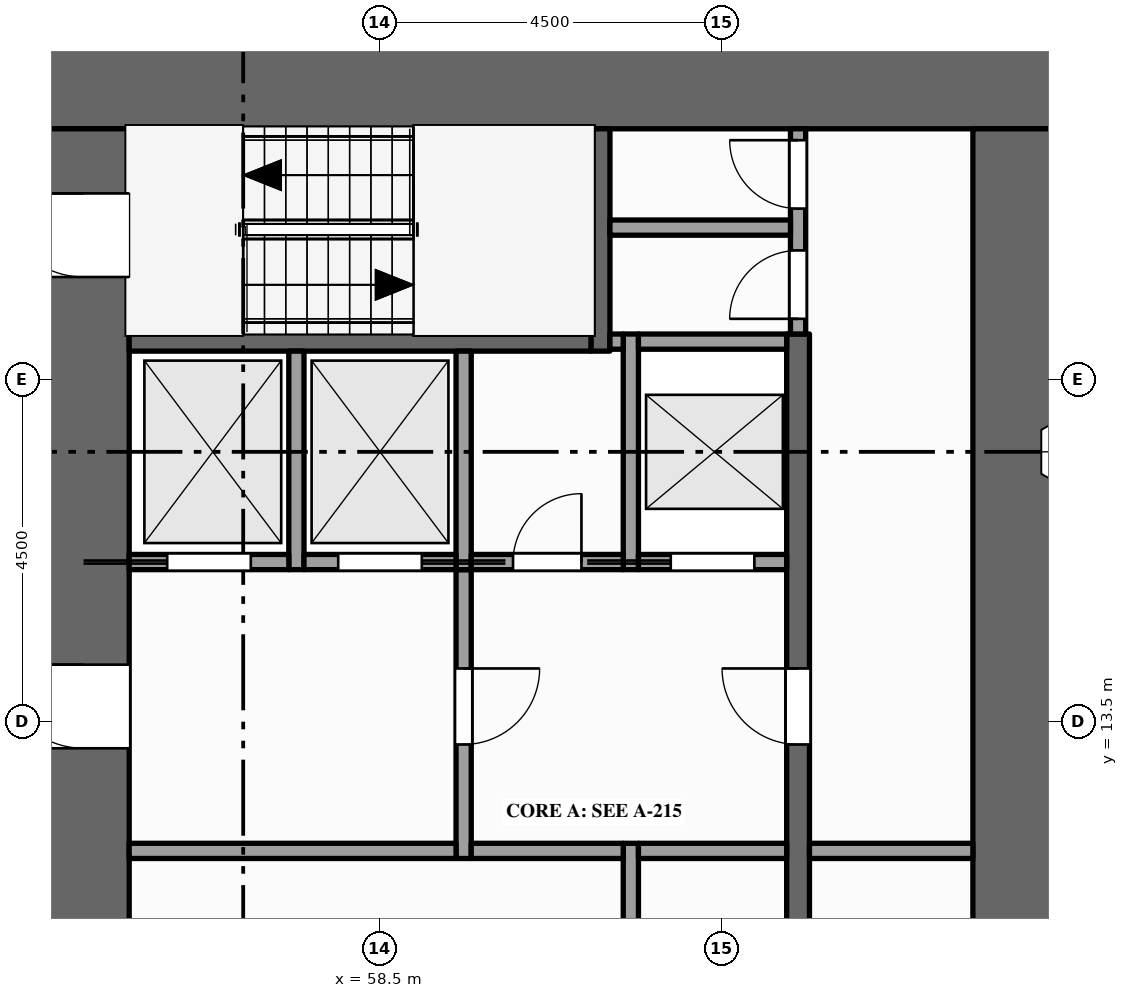
"""IFC4 building model, lengths in metres.
Left out: names, types, materials, properties, quantities, classifications, styles, units other than length and angle.
Written with IfcOpenShell. Run it as: python <this file> out.ifc"""

import sys

from ifc_helpers import new_model, si_unit, direction, frame, frame_2d, origin, place, context, subcontext, project, spatial, rectangle, extrude, element, fill, save


model = new_model("IFC4")
c1 = context("Model", 3, precision=1e-05, world=origin(), true_north=direction((0.0, 1.0)))
c2 = subcontext(c1, "Body", "Model", "MODEL_VIEW")
j1 = project(units=[si_unit("LENGTHUNIT", "METRE"), si_unit("PLANEANGLEUNIT", "RADIAN")], contexts=[c1])
p1 = place(None, origin())
s1 = spatial("IfcSite", under=j1, at=p1, CompositionType="ELEMENT")
p2 = place(p1, origin())
s2 = spatial("IfcBuilding", under=s1, at=p2, CompositionType="ELEMENT")
p3 = place(p2, frame((0.0, 0.0, 77.0)))
s3 = spatial("IfcBuildingStorey", under=s2, at=p3, CompositionType="ELEMENT", Elevation=77.0)
p4 = place(p3, frame((54.0, 21.9, -0.15), z_axis=(0.0, 0.0, 1.0), x_axis=(1.0, 0.0, 0.0)))
e1 = element("IfcWall", 1, at=p4, inside=s3, PredefinedType="SHEAR", context=c2, shape_type="SweptSolid", body=[
    extrude(rectangle(XDim=13.5, YDim=1.2, at=frame_2d((6.75, 0.0))), origin(), (0.0, 0.0, 1.0), 6.0),
])
p5 = place(p3, frame((54.6, 1.2, -0.15), z_axis=(0.0, 0.0, 1.0), x_axis=(0.0, 1.0, 0.0)))
e2 = element("IfcWall", 2, at=p5, inside=s3, PredefinedType="SHEAR", context=c2, shape_type="SweptSolid", body=[
    extrude(rectangle(XDim=20.1, YDim=1.2, at=frame_2d((10.05, 0.0))), origin(), (0.0, 0.0, 1.0), 6.0),
])
p6 = place(p5, frame((5.9, 0.0, 0.15)))
e3 = element("IfcOpeningElement", 3, at=p6, cuts=e2, PredefinedType="OPENING", context=c2, shape_type="SweptSolid", body=[
    extrude(rectangle(XDim=1.8, YDim=2.1, at=frame_2d((0.9, 1.05))), frame((0.0, 0.61, 0.0), z_axis=(0.0, -1.0, 0.0), x_axis=(1.0, 0.0, 0.0)), (0.0, 0.0, 1.0), 1.22),
])
p7 = place(p5, frame((11.95, 0.0, 0.15)))
e4 = element("IfcOpeningElement", 4, at=p7, cuts=e2, PredefinedType="OPENING", context=c2, shape_type="SweptSolid", body=[
    extrude(rectangle(XDim=1.1, YDim=2.1, at=frame_2d((0.55, 1.05))), frame((0.0, 0.61, 0.0), z_axis=(0.0, -1.0, 0.0), x_axis=(1.0, 0.0, 0.0)), (0.0, 0.0, 1.0), 1.22),
])
p8 = place(p5, frame((0.95, 0.0, 0.15)))
e5 = element("IfcOpeningElement", 5, at=p8, cuts=e2, PredefinedType="OPENING", context=c2, shape_type="SweptSolid", body=[
    extrude(rectangle(XDim=1.1, YDim=2.1, at=frame_2d((0.55, 1.05))), frame((0.0, 0.61, 0.0), z_axis=(0.0, -1.0, 0.0), x_axis=(1.0, 0.0, 0.0)), (0.0, 0.0, 1.0), 1.22),
])
p9 = place(p5, frame((18.15, 0.0, 0.15)))
e6 = element("IfcOpeningElement", 6, at=p9, cuts=e2, PredefinedType="OPENING", context=c2, shape_type="SweptSolid", body=[
    extrude(rectangle(XDim=1.1, YDim=2.1, at=frame_2d((0.55, 1.05))), frame((0.0, 0.61, 0.0), z_axis=(0.0, -1.0, 0.0), x_axis=(1.0, 0.0, 0.0)), (0.0, 0.0, 1.0), 1.22),
])
p10 = place(p3, frame((66.9, 1.2, -0.15), z_axis=(0.0, 0.0, 1.0), x_axis=(0.0, 1.0, 0.0)))
e7 = element("IfcWall", 7, at=p10, inside=s3, PredefinedType="SHEAR", context=c2, shape_type="SweptSolid", body=[
    extrude(rectangle(XDim=20.1, YDim=1.2, at=frame_2d((10.05, 0.0))), origin(), (0.0, 0.0, 1.0), 6.0),
])
p11 = place(p3, frame((57.4, 15.5, 0.0), z_axis=(0.0, 0.0, 1.0), x_axis=(0.0, 1.0, 0.0)))
e8 = element("IfcWall", 8, at=p11, inside=s3, PredefinedType="SOLIDWALL", context=c2, shape_type="SweptSolid", body=[
    extrude(rectangle(XDim=2.875, YDim=0.2, at=frame_2d((1.438, 0.0))), origin(), (0.0, 0.0, 1.0), 5.85),
])
p12 = place(p3, frame((59.6, 11.7, 0.0), z_axis=(0.0, 0.0, 1.0), x_axis=(0.0, 1.0, 0.0)))
e9 = element("IfcWall", 9, at=p12, inside=s3, PredefinedType="PARTITIONING", context=c2, shape_type="SweptSolid", body=[
    extrude(rectangle(XDim=3.8, YDim=0.2, at=frame_2d((1.9, 0.0))), origin(), (0.0, 0.0, 1.0), 5.85),
])
p13 = place(p12, frame((1.5, 0.0, 0.0)))
e10 = element("IfcOpeningElement", 10, at=p13, cuts=e9, PredefinedType="OPENING", context=c2, shape_type="SweptSolid", body=[
    extrude(rectangle(XDim=1.0, YDim=2.1, at=frame_2d((0.5, 1.05))), frame((0.0, 0.11, 0.0), z_axis=(0.0, -1.0, 0.0), x_axis=(1.0, 0.0, 0.0)), (0.0, 0.0, 1.0), 0.22),
])
p14 = place(p3, frame((59.6, 15.5, 0.0), z_axis=(0.0, 0.0, 1.0), x_axis=(0.0, 1.0, 0.0)))
e11 = element("IfcWall", 11, at=p14, inside=s3, PredefinedType="SOLIDWALL", context=c2, shape_type="SweptSolid", body=[
    extrude(rectangle(XDim=2.875, YDim=0.2, at=frame_2d((1.438, 0.0))), origin(), (0.0, 0.0, 1.0), 5.85),
])
p15 = place(p3, frame((61.4, 18.375, 0.0), z_axis=(0.0, 0.0, 1.0), x_axis=(0.0, 1.0, 0.0)))
e12 = element("IfcWall", 12, at=p15, inside=s3, PredefinedType="SHEAR", context=c2, shape_type="SweptSolid", body=[
    extrude(rectangle(XDim=2.925, YDim=0.25, at=frame_2d((1.462, 0.0))), origin(), (0.0, 0.0, 1.0), 5.85),
])
p16 = place(p3, frame((61.8, 9.3, 0.0), z_axis=(0.0, 0.0, 1.0), x_axis=(0.0, 1.0, 0.0)))
e13 = element("IfcWall", 13, at=p16, inside=s3, PredefinedType="PARTITIONING", context=c2, shape_type="SweptSolid", body=[
    extrude(rectangle(XDim=2.6, YDim=0.2, at=frame_2d((1.3, 0.0))), origin(), (0.0, 0.0, 1.0), 5.85),
])
p17 = place(p3, frame((61.8, 15.5, 0.0), z_axis=(0.0, 0.0, 1.0), x_axis=(0.0, 1.0, 0.0)))
e14 = element("IfcWall", 14, at=p17, inside=s3, PredefinedType="SOLIDWALL", context=c2, shape_type="SweptSolid", body=[
    extrude(rectangle(XDim=3.1, YDim=0.2, at=frame_2d((1.55, 0.0))), origin(), (0.0, 0.0, 1.0), 5.85),
])
p18 = place(p3, frame((64.0, 4.1, 0.0), z_axis=(0.0, 0.0, 1.0), x_axis=(0.0, 1.0, 0.0)))
e15 = element("IfcWall", 15, at=p18, inside=s3, PredefinedType="SHEAR", context=c2, shape_type="SweptSolid", body=[
    extrude(rectangle(XDim=14.5, YDim=0.3, at=frame_2d((7.25, 0.0))), origin(), (0.0, 0.0, 1.0), 5.85),
])
p19 = place(p18, frame((3.4, 0.0, 0.0)))
e16 = element("IfcOpeningElement", 16, at=p19, cuts=e15, PredefinedType="OPENING", context=c2, shape_type="SweptSolid", body=[
    extrude(rectangle(XDim=1.0, YDim=2.1, at=frame_2d((0.5, 1.05))), frame((0.0, 0.16, 0.0), z_axis=(0.0, -1.0, 0.0), x_axis=(1.0, 0.0, 0.0)), (0.0, 0.0, 1.0), 0.32),
])
p20 = place(p18, frame((9.1, 0.0, 0.0)))
e17 = element("IfcOpeningElement", 17, at=p20, cuts=e15, PredefinedType="OPENING", context=c2, shape_type="SweptSolid", body=[
    extrude(rectangle(XDim=1.0, YDim=2.1, at=frame_2d((0.5, 1.05))), frame((0.0, 0.16, 0.0), z_axis=(0.0, -1.0, 0.0), x_axis=(1.0, 0.0, 0.0)), (0.0, 0.0, 1.0), 0.32),
])
p21 = place(p3, frame((64.0, 18.6, 0.0), z_axis=(0.0, 0.0, 1.0), x_axis=(0.0, 1.0, 0.0)))
e18 = element("IfcWall", 18, at=p21, inside=s3, PredefinedType="PARTITIONING", context=c2, shape_type="SweptSolid", body=[
    extrude(rectangle(XDim=2.7, YDim=0.2, at=frame_2d((1.35, 0.0))), origin(), (0.0, 0.0, 1.0), 5.85),
])
p22 = place(p21, frame((0.2, 0.0, 0.0)))
e19 = element("IfcOpeningElement", 19, at=p22, cuts=e18, PredefinedType="OPENING", context=c2, shape_type="SweptSolid", body=[
    extrude(rectangle(XDim=0.9, YDim=2.1, at=frame_2d((0.45, 1.05))), frame((0.0, 0.11, 0.0), z_axis=(0.0, -1.0, 0.0), x_axis=(1.0, 0.0, 0.0)), (0.0, 0.0, 1.0), 0.22),
])
p23 = place(p21, frame((1.65, 0.0, 0.0)))
e20 = element("IfcOpeningElement", 20, at=p23, cuts=e18, PredefinedType="OPENING", context=c2, shape_type="SweptSolid", body=[
    extrude(rectangle(XDim=0.9, YDim=2.1, at=frame_2d((0.45, 1.05))), frame((0.0, 0.11, 0.0), z_axis=(0.0, -1.0, 0.0), x_axis=(1.0, 0.0, 0.0)), (0.0, 0.0, 1.0), 0.22),
])
p24 = place(p3, frame((55.2, 11.8, 0.0), z_axis=(0.0, 0.0, 1.0), x_axis=(1.0, 0.0, 0.0)))
e21 = element("IfcWall", 21, at=p24, inside=s3, PredefinedType="PARTITIONING", context=c2, shape_type="SweptSolid", body=[
    extrude(rectangle(XDim=4.3, YDim=0.2, at=frame_2d((2.15, 0.0))), origin(), (0.0, 0.0, 1.0), 5.85),
])
p25 = place(p3, frame((59.7, 11.8, 0.0), z_axis=(0.0, 0.0, 1.0), x_axis=(1.0, 0.0, 0.0)))
e22 = element("IfcWall", 22, at=p25, inside=s3, PredefinedType="PARTITIONING", context=c2, shape_type="SweptSolid", body=[
    extrude(rectangle(XDim=2.0, YDim=0.2, at=frame_2d((1.0, 0.0))), origin(), (0.0, 0.0, 1.0), 5.85),
])
p26 = place(p3, frame((61.9, 11.8, 0.0), z_axis=(0.0, 0.0, 1.0), x_axis=(1.0, 0.0, 0.0)))
e23 = element("IfcWall", 23, at=p26, inside=s3, PredefinedType="PARTITIONING", context=c2, shape_type="SweptSolid", body=[
    extrude(rectangle(XDim=1.95, YDim=0.2, at=frame_2d((0.975, 0.0))), origin(), (0.0, 0.0, 1.0), 5.85),
])
p27 = place(p3, frame((64.15, 11.8, 0.0), z_axis=(0.0, 0.0, 1.0), x_axis=(1.0, 0.0, 0.0)))
e24 = element("IfcWall", 24, at=p27, inside=s3, PredefinedType="PARTITIONING", context=c2, shape_type="SweptSolid", body=[
    extrude(rectangle(XDim=2.15, YDim=0.2, at=frame_2d((1.075, 0.0))), origin(), (0.0, 0.0, 1.0), 5.85),
])
p28 = place(p3, frame((55.2, 15.6, 0.0), z_axis=(0.0, 0.0, 1.0), x_axis=(1.0, 0.0, 0.0)))
e25 = element("IfcWall", 25, at=p28, inside=s3, PredefinedType="SOLIDWALL", context=c2, shape_type="SweptSolid", body=[
    extrude(rectangle(XDim=2.1, YDim=0.2, at=frame_2d((1.05, 0.0))), origin(), (0.0, 0.0, 1.0), 5.85),
])
p29 = place(p28, frame((0.5, 0.0, 0.012)))
e26 = element("IfcOpeningElement", 26, at=p29, cuts=e25, PredefinedType="OPENING", context=c2, shape_type="SweptSolid", body=[
    extrude(rectangle(XDim=1.1, YDim=2.1, at=frame_2d((0.55, 1.05))), frame((0.0, 0.11, 0.0), z_axis=(0.0, -1.0, 0.0), x_axis=(1.0, 0.0, 0.0)), (0.0, 0.0, 1.0), 0.22),
])
p30 = place(p3, frame((57.5, 15.6, 0.0), z_axis=(0.0, 0.0, 1.0), x_axis=(1.0, 0.0, 0.0)))
e27 = element("IfcWall", 27, at=p30, inside=s3, PredefinedType="SOLIDWALL", context=c2, shape_type="SweptSolid", body=[
    extrude(rectangle(XDim=2.0, YDim=0.2, at=frame_2d((1.0, 0.0))), origin(), (0.0, 0.0, 1.0), 5.85),
])
p31 = place(p30, frame((0.45, 0.0, 0.012)))
e28 = element("IfcOpeningElement", 28, at=p31, cuts=e27, PredefinedType="OPENING", context=c2, shape_type="SweptSolid", body=[
    extrude(rectangle(XDim=1.1, YDim=2.1, at=frame_2d((0.55, 1.05))), frame((0.0, 0.11, 0.0), z_axis=(0.0, -1.0, 0.0), x_axis=(1.0, 0.0, 0.0)), (0.0, 0.0, 1.0), 0.22),
])
p32 = place(p3, frame((59.7, 15.6, 0.0), z_axis=(0.0, 0.0, 1.0), x_axis=(1.0, 0.0, 0.0)))
e29 = element("IfcWall", 29, at=p32, inside=s3, PredefinedType="PARTITIONING", context=c2, shape_type="SweptSolid", body=[
    extrude(rectangle(XDim=2.0, YDim=0.2, at=frame_2d((1.0, 0.0))), origin(), (0.0, 0.0, 1.0), 5.85),
])
p33 = place(p32, frame((0.55, 0.0, 0.0)))
e30 = element("IfcOpeningElement", 30, at=p33, cuts=e29, PredefinedType="OPENING", context=c2, shape_type="SweptSolid", body=[
    extrude(rectangle(XDim=0.9, YDim=2.1, at=frame_2d((0.45, 1.05))), frame((0.0, 0.11, 0.0), z_axis=(0.0, -1.0, 0.0), x_axis=(1.0, 0.0, 0.0)), (0.0, 0.0, 1.0), 0.22),
])
p34 = place(p3, frame((61.9, 15.6, 0.0), z_axis=(0.0, 0.0, 1.0), x_axis=(1.0, 0.0, 0.0)))
e31 = element("IfcWall", 31, at=p34, inside=s3, PredefinedType="SOLIDWALL", context=c2, shape_type="SweptSolid", body=[
    extrude(rectangle(XDim=1.95, YDim=0.2, at=frame_2d((0.975, 0.0))), origin(), (0.0, 0.0, 1.0), 5.85),
])
p35 = place(p34, frame((0.425, 0.0, 0.012)))
e32 = element("IfcOpeningElement", 32, at=p35, cuts=e31, PredefinedType="OPENING", context=c2, shape_type="SweptSolid", body=[
    extrude(rectangle(XDim=1.1, YDim=2.1, at=frame_2d((0.55, 1.05))), frame((0.0, 0.11, 0.0), z_axis=(0.0, -1.0, 0.0), x_axis=(1.0, 0.0, 0.0)), (0.0, 0.0, 1.0), 0.22),
])
p36 = place(p3, frame((55.2, 18.5, 0.0), z_axis=(0.0, 0.0, 1.0), x_axis=(1.0, 0.0, 0.0)))
e33 = element("IfcWall", 33, at=p36, inside=s3, PredefinedType="SHEAR", context=c2, shape_type="SweptSolid", body=[
    extrude(rectangle(XDim=6.075, YDim=0.25, at=frame_2d((3.038, 0.0))), origin(), (0.0, 0.0, 1.0), 5.85),
])
p37 = place(p3, frame((61.525, 18.5, 0.0), z_axis=(0.0, 0.0, 1.0), x_axis=(1.0, 0.0, 0.0)))
e34 = element("IfcWall", 34, at=p37, inside=s3, PredefinedType="PARTITIONING", context=c2, shape_type="SweptSolid", body=[
    extrude(rectangle(XDim=0.175, YDim=0.2, at=frame_2d((0.087, 0.0))), origin(), (0.0, 0.0, 1.0), 5.85),
])
p38 = place(p3, frame((61.9, 18.5, 0.0), z_axis=(0.0, 0.0, 1.0), x_axis=(1.0, 0.0, 0.0)))
e35 = element("IfcWall", 35, at=p38, inside=s3, PredefinedType="SOLIDWALL", context=c2, shape_type="SweptSolid", body=[
    extrude(rectangle(XDim=1.95, YDim=0.2, at=frame_2d((0.975, 0.0))), origin(), (0.0, 0.0, 1.0), 5.85),
])
p39 = place(p3, frame((61.525, 20.0, 0.0), z_axis=(0.0, 0.0, 1.0), x_axis=(1.0, 0.0, 0.0)))
e36 = element("IfcWall", 36, at=p39, inside=s3, PredefinedType="PARTITIONING", context=c2, shape_type="SweptSolid", body=[
    extrude(rectangle(XDim=2.375, YDim=0.2, at=frame_2d((1.188, 0.0))), origin(), (0.0, 0.0, 1.0), 5.85),
])
p40 = place(p29, origin())
e37 = element("IfcDoor", 37, at=p40, inside=s3, OperationType="SLIDING_TO_LEFT", PredefinedType="DOOR", context=c2, shape_type="SweptSolid", body=[
    extrude(rectangle(XDim=1.1, YDim=2.1, at=frame_2d((0.55, 1.05))), frame((0.0, 0.025, 0.0), z_axis=(0.0, -1.0, 0.0), x_axis=(1.0, 0.0, 0.0)), (0.0, 0.0, 1.0), 0.05),
])
fill(e26, e37)
p41 = place(p31, origin())
e38 = element("IfcDoor", 38, at=p41, inside=s3, OperationType="SLIDING_TO_RIGHT", PredefinedType="DOOR", context=c2, shape_type="SweptSolid", body=[
    extrude(rectangle(XDim=1.1, YDim=2.1, at=frame_2d((0.55, 1.05))), frame((0.0, 0.025, 0.0), z_axis=(0.0, -1.0, 0.0), x_axis=(1.0, 0.0, 0.0)), (0.0, 0.0, 1.0), 0.05),
])
fill(e28, e38)
p42 = place(p35, origin())
e39 = element("IfcDoor", 39, at=p42, inside=s3, OperationType="SLIDING_TO_LEFT", PredefinedType="DOOR", context=c2, shape_type="SweptSolid", body=[
    extrude(rectangle(XDim=1.1, YDim=2.1, at=frame_2d((0.55, 1.05))), frame((0.0, 0.025, 0.0), z_axis=(0.0, -1.0, 0.0), x_axis=(1.0, 0.0, 0.0)), (0.0, 0.0, 1.0), 0.05),
])
fill(e32, e39)
p43 = place(p7, origin())
e40 = element("IfcDoor", 40, at=p43, inside=s3, OperationType="SINGLE_SWING_RIGHT", PredefinedType="DOOR", context=c2, shape_type="SweptSolid", body=[
    extrude(rectangle(XDim=1.1, YDim=2.1, at=frame_2d((0.55, 1.05))), frame((0.0, 0.025, 0.0), z_axis=(0.0, -1.0, 0.0), x_axis=(1.0, 0.0, 0.0)), (0.0, 0.0, 1.0), 0.05),
])
fill(e4, e40)
p44 = place(p13, origin())
e41 = element("IfcDoor", 41, at=p44, inside=s3, OperationType="SINGLE_SWING_RIGHT", PredefinedType="DOOR", context=c2, shape_type="SweptSolid", body=[
    extrude(rectangle(XDim=1.0, YDim=2.1, at=frame_2d((0.5, 1.05))), frame((0.0, 0.025, 0.0), z_axis=(0.0, -1.0, 0.0), x_axis=(1.0, 0.0, 0.0)), (0.0, 0.0, 1.0), 0.05),
])
fill(e10, e41)
p45 = place(p20, origin())
e42 = element("IfcDoor", 42, at=p45, inside=s3, OperationType="SINGLE_SWING_RIGHT", PredefinedType="DOOR", context=c2, shape_type="SweptSolid", body=[
    extrude(rectangle(XDim=1.0, YDim=2.1, at=frame_2d((0.5, 1.05))), frame((0.0, 0.025, 0.0), z_axis=(0.0, -1.0, 0.0), x_axis=(1.0, 0.0, 0.0)), (0.0, 0.0, 1.0), 0.05),
])
fill(e17, e42)
p46 = place(p9, origin())
e43 = element("IfcDoor", 43, at=p46, inside=s3, OperationType="SINGLE_SWING_RIGHT", PredefinedType="DOOR", context=c2, shape_type="SweptSolid", body=[
    extrude(rectangle(XDim=1.1, YDim=2.1, at=frame_2d((0.55, 1.05))), frame((0.0, 0.025, 0.0), z_axis=(0.0, -1.0, 0.0), x_axis=(1.0, 0.0, 0.0)), (0.0, 0.0, 1.0), 0.05),
])
fill(e6, e43)
p47 = place(p22, origin())
e44 = element("IfcDoor", 44, at=p47, inside=s3, OperationType="SINGLE_SWING_LEFT", PredefinedType="DOOR", context=c2, shape_type="SweptSolid", body=[
    extrude(rectangle(XDim=0.9, YDim=2.1, at=frame_2d((0.45, 1.05))), frame((0.0, 0.025, 0.0), z_axis=(0.0, -1.0, 0.0), x_axis=(1.0, 0.0, 0.0)), (0.0, 0.0, 1.0), 0.05),
])
fill(e19, e44)
p48 = place(p23, origin())
e45 = element("IfcDoor", 45, at=p48, inside=s3, OperationType="SINGLE_SWING_RIGHT", PredefinedType="DOOR", context=c2, shape_type="SweptSolid", body=[
    extrude(rectangle(XDim=0.9, YDim=2.1, at=frame_2d((0.45, 1.05))), frame((0.0, 0.025, 0.0), z_axis=(0.0, -1.0, 0.0), x_axis=(1.0, 0.0, 0.0)), (0.0, 0.0, 1.0), 0.05),
])
fill(e20, e45)
p49 = place(p33, origin())
e46 = element("IfcDoor", 46, at=p49, inside=s3, OperationType="SINGLE_SWING_RIGHT", PredefinedType="DOOR", context=c2, shape_type="SweptSolid", body=[
    extrude(rectangle(XDim=0.9, YDim=2.1, at=frame_2d((0.45, 1.05))), frame((0.0, 0.025, 0.0), z_axis=(0.0, -1.0, 0.0), x_axis=(1.0, 0.0, 0.0)), (0.0, 0.0, 1.0), 0.05),
])
fill(e30, e46)
save(model, sys.argv[1])
